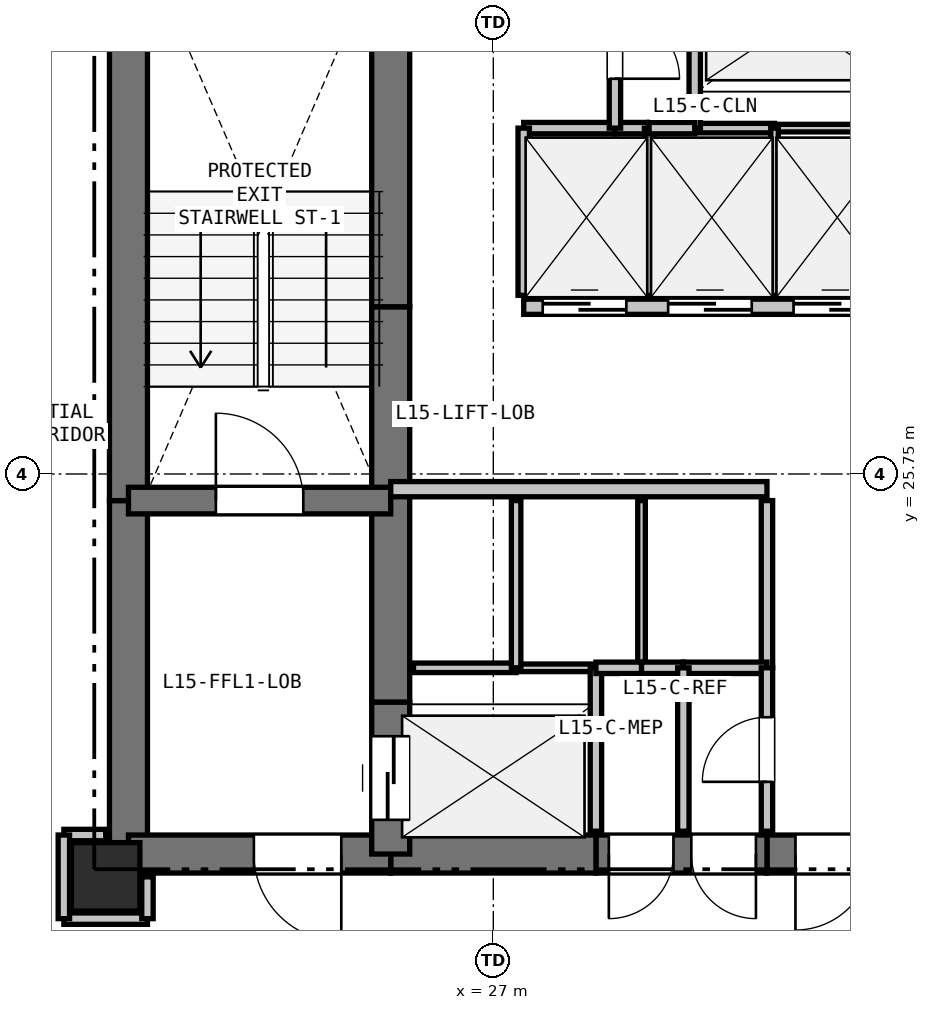
"""IFC4 building model, lengths in metres.
Left out: names, types, materials, properties, quantities, classifications, styles, units other than length and angle.
Written with IfcOpenShell. Run it as: python <this file> out.ifc"""

import sys

from ifc_helpers import new_model, si_unit, direction, frame, frame_2d, origin, origin_2d, place, context, subcontext, project, spatial, rectangle, extrude, element, fill, save


model = new_model("IFC4")
c1 = context("Model", 3, precision=1e-05, world=origin(), true_north=direction((0.0, 1.0)))
c2 = subcontext(c1, "Body", "Model", "MODEL_VIEW")
j1 = project(units=[si_unit("LENGTHUNIT", "METRE"), si_unit("PLANEANGLEUNIT", "RADIAN")], contexts=[c1])
p1 = place(None, origin())
s1 = spatial("IfcSite", under=j1, at=p1, CompositionType="ELEMENT")
p2 = place(p1, origin())
s2 = spatial("IfcBuilding", under=s1, at=p2, CompositionType="ELEMENT")
p3 = place(p2, frame((0.0, 0.0, 55.5)))
s3 = spatial("IfcBuildingStorey", under=s2, at=p3, CompositionType="ELEMENT", Elevation=55.5)
p4 = place(p3, frame((21.9, 20.45, 0.0), z_axis=(0.0, 0.0, 1.0), x_axis=(1.0, 0.0, 0.0)))
e1 = element("IfcColumn", 1, at=p4, inside=s3, PredefinedType="COLUMN", context=c2, shape_type="SweptSolid", body=[
    extrude(rectangle(XDim=0.9, YDim=0.9, at=origin_2d()), origin(), (0.0, 0.0, 1.0), 3.3),
])
p5 = place(p3, frame((22.2, 20.75, 0.0), z_axis=(0.0, 0.0, 1.0), x_axis=(0.0, 1.0, 0.0)))
e2 = element("IfcWall", 2, at=p5, inside=s3, PredefinedType="SHEAR", context=c2, shape_type="SweptSolid", body=[
    extrude(rectangle(XDim=4.65, YDim=0.5, at=frame_2d((2.325, 0.0))), origin(), (0.0, 0.0, 1.0), 3.04),
])
p6 = place(p3, frame((22.2, 25.4, 0.0), z_axis=(0.0, 0.0, 1.0), x_axis=(0.0, 1.0, 0.0)))
e3 = element("IfcWall", 3, at=p6, inside=s3, PredefinedType="SHEAR", context=c2, shape_type="SweptSolid", body=[
    extrude(rectangle(XDim=7.35, YDim=0.5, at=frame_2d((3.675, 0.0))), origin(), (0.0, 0.0, 1.0), 3.04),
])
p7 = place(p3, frame((32.35, 20.75, 0.0), z_axis=(0.0, 0.0, 1.0), x_axis=(-1.0, 0.0, 0.0)))
e4 = element("IfcWall", 4, at=p7, inside=s3, PredefinedType="SHEAR", context=c2, shape_type="SweptSolid", body=[
    extrude(rectangle(XDim=1.75, YDim=0.5, at=frame_2d((0.875, 0.0))), origin(), (0.0, 0.0, 1.0), 3.04),
])
p8 = place(p7, frame((0.375, 0.0, 0.0)))
e5 = element("IfcOpeningElement", 5, at=p8, cuts=e4, PredefinedType="OPENING", context=c2, shape_type="SweptSolid", body=[
    extrude(rectangle(XDim=1.0, YDim=2.15, at=frame_2d((0.5, 1.075))), frame((0.0, 0.26, 0.0), z_axis=(0.0, -1.0, 0.0), x_axis=(1.0, 0.0, 0.0)), (0.0, 0.0, 1.0), 0.52),
])
p9 = place(p3, frame((30.6, 20.75, 0.0), z_axis=(0.0, 0.0, 1.0), x_axis=(-1.0, 0.0, 0.0)))
e6 = element("IfcWall", 6, at=p9, inside=s3, PredefinedType="SHEAR", context=c2, shape_type="SweptSolid", body=[
    extrude(rectangle(XDim=2.25, YDim=0.5, at=frame_2d((1.125, 0.0))), origin(), (0.0, 0.0, 1.0), 3.04),
])
p10 = place(p9, frame((1.23, 0.0, 0.0)))
e7 = element("IfcOpeningElement", 7, at=p10, cuts=e6, PredefinedType="OPENING", context=c2, shape_type="SweptSolid", body=[
    extrude(rectangle(XDim=0.85, YDim=2.1, at=frame_2d((0.425, 1.05))), frame((0.0, 0.26, 0.0), z_axis=(0.0, -1.0, 0.0), x_axis=(1.0, 0.0, 0.0)), (0.0, 0.0, 1.0), 0.52),
])
p11 = place(p9, frame((0.145, 0.0, 0.0)))
e8 = element("IfcOpeningElement", 8, at=p11, cuts=e6, PredefinedType="OPENING", context=c2, shape_type="SweptSolid", body=[
    extrude(rectangle(XDim=0.85, YDim=2.1, at=frame_2d((0.425, 1.05))), frame((0.0, 0.26, 0.0), z_axis=(0.0, -1.0, 0.0), x_axis=(1.0, 0.0, 0.0)), (0.0, 0.0, 1.0), 0.52),
])
p12 = place(p3, frame((28.35, 20.75, 0.0), z_axis=(0.0, 0.0, 1.0), x_axis=(-1.0, 0.0, 0.0)))
e9 = element("IfcWall", 9, at=p12, inside=s3, PredefinedType="SHEAR", context=c2, shape_type="SweptSolid", body=[
    extrude(rectangle(XDim=2.7, YDim=0.5, at=frame_2d((1.35, 0.0))), origin(), (0.0, 0.0, 1.0), 3.04),
])
p13 = place(p3, frame((25.65, 20.75, 0.0), z_axis=(0.0, 0.0, 1.0), x_axis=(-1.0, 0.0, 0.0)))
e10 = element("IfcWall", 10, at=p13, inside=s3, PredefinedType="SHEAR", context=c2, shape_type="SweptSolid", body=[
    extrude(rectangle(XDim=3.45, YDim=0.5, at=frame_2d((1.725, 0.0))), origin(), (0.0, 0.0, 1.0), 3.04),
])
p14 = place(p13, frame((0.65, 0.0, 0.0)))
e11 = element("IfcOpeningElement", 11, at=p14, cuts=e10, PredefinedType="OPENING", context=c2, shape_type="SweptSolid", body=[
    extrude(rectangle(XDim=1.15, YDim=2.15, at=frame_2d((0.575, 1.075))), frame((0.0, 0.26, 0.0), z_axis=(0.0, -1.0, 0.0), x_axis=(1.0, 0.0, 0.0)), (0.0, 0.0, 1.0), 0.52),
])
p15 = place(p3, frame((25.65, 20.75, 0.0), z_axis=(0.0, 0.0, 1.0), x_axis=(0.0, 1.0, 0.0)))
e12 = element("IfcWall", 12, at=p15, inside=s3, PredefinedType="SHEAR", context=c2, shape_type="SweptSolid", body=[
    extrude(rectangle(XDim=2.0, YDim=0.5, at=frame_2d((1.0, 0.0))), origin(), (0.0, 0.0, 1.0), 3.04),
])
p16 = place(p15, frame((0.45, 0.0, 0.0)))
e13 = element("IfcOpeningElement", 13, at=p16, cuts=e12, PredefinedType="OPENING", context=c2, shape_type="SweptSolid", body=[
    extrude(rectangle(XDim=1.1, YDim=2.15, at=frame_2d((0.55, 1.075))), frame((0.0, 0.26, 0.0), z_axis=(0.0, -1.0, 0.0), x_axis=(1.0, 0.0, 0.0)), (0.0, 0.0, 1.0), 0.52),
])
p17 = place(p3, frame((25.65, 22.75, 0.0), z_axis=(0.0, 0.0, 1.0), x_axis=(0.0, 1.0, 0.0)))
e14 = element("IfcWall", 14, at=p17, inside=s3, PredefinedType="SHEAR", context=c2, shape_type="SweptSolid", body=[
    extrude(rectangle(XDim=2.8, YDim=0.5, at=frame_2d((1.4, 0.0))), origin(), (0.0, 0.0, 1.0), 3.04),
])
p18 = place(p3, frame((25.65, 25.55, 0.0), z_axis=(0.0, 0.0, 1.0), x_axis=(0.0, 1.0, 0.0)))
e15 = element("IfcWall", 15, at=p18, inside=s3, PredefinedType="SHEAR", context=c2, shape_type="SweptSolid", body=[
    extrude(rectangle(XDim=2.4, YDim=0.5, at=frame_2d((1.2, 0.0))), origin(), (0.0, 0.0, 1.0), 3.04),
])
p19 = place(p3, frame((25.65, 27.95, 0.0), z_axis=(0.0, 0.0, 1.0), x_axis=(0.0, 1.0, 0.0)))
e16 = element("IfcWall", 16, at=p19, inside=s3, PredefinedType="SHEAR", context=c2, shape_type="SweptSolid", body=[
    extrude(rectangle(XDim=4.8, YDim=0.5, at=frame_2d((2.4, 0.0))), origin(), (0.0, 0.0, 1.0), 3.04),
])
p20 = place(p3, frame((22.2, 25.4, 0.0), z_axis=(0.0, 0.0, 1.0), x_axis=(1.0, 0.0, 0.0)))
e17 = element("IfcWall", 17, at=p20, inside=s3, PredefinedType="SHEAR", context=c2, shape_type="SweptSolid", body=[
    extrude(rectangle(XDim=3.45, YDim=0.35, at=frame_2d((1.725, 0.0))), origin(), (0.0, 0.0, 1.0), 3.04),
])
p21 = place(p20, frame((1.15, 0.0, 0.0)))
e18 = element("IfcOpeningElement", 18, at=p21, cuts=e17, PredefinedType="OPENING", context=c2, shape_type="SweptSolid", body=[
    extrude(rectangle(XDim=1.15, YDim=2.15, at=frame_2d((0.575, 1.075))), frame((0.0, 0.185, 0.0), z_axis=(0.0, -1.0, 0.0), x_axis=(1.0, 0.0, 0.0)), (0.0, 0.0, 1.0), 0.37),
])
p22 = place(p3, frame((25.65, 25.55, 0.0), z_axis=(0.0, 0.0, 1.0), x_axis=(1.0, 0.0, 0.0)))
e19 = element("IfcWall", 19, at=p22, inside=s3, PredefinedType="PARTITIONING", context=c2, shape_type="SweptSolid", body=[
    extrude(rectangle(XDim=4.95, YDim=0.2, at=frame_2d((2.475, 0.0))), origin(), (0.0, 0.0, 1.0), 3.04),
])
p23 = place(p3, frame((27.4, 27.95, 0.0), z_axis=(0.0, 0.0, 1.0), x_axis=(1.0, 0.0, 0.0)))
e20 = element("IfcWall", 20, at=p23, inside=s3, PredefinedType="PARTITIONING", context=c2, shape_type="SweptSolid", body=[
    extrude(rectangle(XDim=4.95, YDim=0.2, at=frame_2d((2.475, 0.0))), origin(), (0.0, 0.0, 1.0), 3.04),
])
p24 = place(p23, frame((0.25, 0.0, 0.0)))
e21 = element("IfcOpeningElement", 21, at=p24, cuts=e20, PredefinedType="OPENING", context=c2, shape_type="SweptSolid", body=[
    extrude(rectangle(XDim=1.1, YDim=2.15, at=frame_2d((0.55, 1.075))), frame((0.0, 0.11, 0.0), z_axis=(0.0, -1.0, 0.0), x_axis=(1.0, 0.0, 0.0)), (0.0, 0.0, 1.0), 0.22),
])
p25 = place(p23, frame((1.9, 0.0, 0.0)))
e22 = element("IfcOpeningElement", 22, at=p25, cuts=e20, PredefinedType="OPENING", context=c2, shape_type="SweptSolid", body=[
    extrude(rectangle(XDim=1.1, YDim=2.15, at=frame_2d((0.55, 1.075))), frame((0.0, 0.11, 0.0), z_axis=(0.0, -1.0, 0.0), x_axis=(1.0, 0.0, 0.0)), (0.0, 0.0, 1.0), 0.22),
])
p26 = place(p23, frame((3.55, 0.0, 0.0)))
e23 = element("IfcOpeningElement", 23, at=p26, cuts=e20, PredefinedType="OPENING", context=c2, shape_type="SweptSolid", body=[
    extrude(rectangle(XDim=1.1, YDim=2.15, at=frame_2d((0.55, 1.075))), frame((0.0, 0.11, 0.0), z_axis=(0.0, -1.0, 0.0), x_axis=(1.0, 0.0, 0.0)), (0.0, 0.0, 1.0), 0.22),
])
p27 = place(p3, frame((25.95, 23.2, 0.0), z_axis=(0.0, 0.0, 1.0), x_axis=(1.0, 0.0, 0.0)))
e24 = element("IfcWall", 24, at=p27, inside=s3, PredefinedType="PARTITIONING", context=c2, shape_type="SweptSolid", body=[
    extrude(rectangle(XDim=1.35, YDim=0.125, at=frame_2d((0.675, 0.0))), origin(), (0.0, 0.0, 1.0), 3.04),
])
p28 = place(p3, frame((27.3, 23.2, 0.0), z_axis=(0.0, 0.0, 1.0), x_axis=(1.0, 0.0, 0.0)))
e25 = element("IfcWall", 25, at=p28, inside=s3, PredefinedType="PARTITIONING", context=c2, shape_type="SweptSolid", body=[
    extrude(rectangle(XDim=1.05, YDim=0.1, at=frame_2d((0.525, 0.0))), origin(), (0.0, 0.0, 1.0), 3.04),
])
p29 = place(p3, frame((28.35, 23.2, 0.0), z_axis=(0.0, 0.0, 1.0), x_axis=(0.0, -1.0, 0.0)))
e26 = element("IfcWall", 26, at=p29, inside=s3, PredefinedType="PARTITIONING", context=c2, shape_type="SweptSolid", body=[
    extrude(rectangle(XDim=2.15, YDim=0.15, at=frame_2d((1.075, 0.0))), origin(), (0.0, 0.0, 1.0), 3.04),
])
p30 = place(p3, frame((32.05, 30.3, 0.0), z_axis=(0.0, 0.0, 1.0), x_axis=(-1.0, 0.0, 0.0)))
e27 = element("IfcWall", 27, at=p30, inside=s3, PredefinedType="PARTITIONING", context=c2, shape_type="SweptSolid", body=[
    extrude(rectangle(XDim=1.35, YDim=0.1, at=frame_2d((0.675, 0.0))), origin(), (0.0, 0.0, 1.0), 3.04),
])
p31 = place(p3, frame((30.7, 30.3, 0.0), z_axis=(0.0, 0.0, 1.0), x_axis=(-1.0, 0.0, 0.0)))
e28 = element("IfcWall", 28, at=p31, inside=s3, PredefinedType="PARTITIONING", context=c2, shape_type="SweptSolid", body=[
    extrude(rectangle(XDim=1.05, YDim=0.125, at=frame_2d((0.525, 0.0))), origin(), (0.0, 0.0, 1.0), 3.04),
])
p32 = place(p3, frame((29.65, 30.3, 0.0), z_axis=(0.0, 0.0, 1.0), x_axis=(0.0, 1.0, 0.0)))
e29 = element("IfcWall", 29, at=p32, inside=s3, PredefinedType="PARTITIONING", context=c2, shape_type="SweptSolid", body=[
    extrude(rectangle(XDim=2.15, YDim=0.15, at=frame_2d((1.075, 0.0))), origin(), (0.0, 0.0, 1.0), 3.04),
])
p33 = place(p3, frame((27.3, 25.4, 0.0), z_axis=(0.0, 0.0, 1.0), x_axis=(0.0, -1.0, 0.0)))
e30 = element("IfcWall", 30, at=p33, inside=s3, PredefinedType="PARTITIONING", context=c2, shape_type="SweptSolid", body=[
    extrude(rectangle(XDim=2.2, YDim=0.125, at=frame_2d((1.1, 0.0))), origin(), (0.0, 0.0, 1.0), 3.04),
])
p34 = place(p3, frame((28.95, 25.4, 0.0), z_axis=(0.0, 0.0, 1.0), x_axis=(0.0, -1.0, 0.0)))
e31 = element("IfcWall", 31, at=p34, inside=s3, PredefinedType="PARTITIONING", context=c2, shape_type="SweptSolid", body=[
    extrude(rectangle(XDim=2.2, YDim=0.1, at=frame_2d((1.1, 0.0))), origin(), (0.0, 0.0, 1.0), 3.04),
])
p35 = place(p3, frame((28.95, 23.2, 0.0), z_axis=(0.0, 0.0, 1.0), x_axis=(-1.0, 0.0, 0.0)))
e32 = element("IfcWall", 32, at=p35, inside=s3, PredefinedType="PARTITIONING", context=c2, shape_type="SweptSolid", body=[
    extrude(rectangle(XDim=0.6, YDim=0.15, at=frame_2d((0.3, 0.0))), origin(), (0.0, 0.0, 1.0), 3.04),
])
p36 = place(p3, frame((30.6, 25.4, 0.0), z_axis=(0.0, 0.0, 1.0), x_axis=(0.0, -1.0, 0.0)))
e33 = element("IfcWall", 33, at=p36, inside=s3, PredefinedType="PARTITIONING", context=c2, shape_type="SweptSolid", body=[
    extrude(rectangle(XDim=2.2, YDim=0.15, at=frame_2d((1.1, 0.0))), origin(), (0.0, 0.0, 1.0), 3.04),
])
p37 = place(p3, frame((30.6, 23.2, 0.0), z_axis=(0.0, 0.0, 1.0), x_axis=(-1.0, 0.0, 0.0)))
e34 = element("IfcWall", 34, at=p37, inside=s3, PredefinedType="PARTITIONING", context=c2, shape_type="SweptSolid", body=[
    extrude(rectangle(XDim=1.1, YDim=0.15, at=frame_2d((0.55, 0.0))), origin(), (0.0, 0.0, 1.0), 3.04),
])
p38 = place(p3, frame((29.5, 23.2, 0.0), z_axis=(0.0, 0.0, 1.0), x_axis=(-1.0, 0.0, 0.0)))
e35 = element("IfcWall", 35, at=p38, inside=s3, PredefinedType="PARTITIONING", context=c2, shape_type="SweptSolid", body=[
    extrude(rectangle(XDim=0.55, YDim=0.15, at=frame_2d((0.275, 0.0))), origin(), (0.0, 0.0, 1.0), 3.04),
])
p39 = place(p3, frame((27.4, 30.3, 0.0), z_axis=(0.0, 0.0, 1.0), x_axis=(1.0, 0.0, 0.0)))
e36 = element("IfcWall", 36, at=p39, inside=s3, PredefinedType="PARTITIONING", context=c2, shape_type="SweptSolid", body=[
    extrude(rectangle(XDim=1.2, YDim=0.15, at=frame_2d((0.6, 0.0))), origin(), (0.0, 0.0, 1.0), 3.04),
])
p40 = place(p3, frame((28.6, 30.3, 0.0), z_axis=(0.0, 0.0, 1.0), x_axis=(1.0, 0.0, 0.0)))
e37 = element("IfcWall", 37, at=p40, inside=s3, PredefinedType="PARTITIONING", context=c2, shape_type="SweptSolid", body=[
    extrude(rectangle(XDim=0.45, YDim=0.15, at=frame_2d((0.225, 0.0))), origin(), (0.0, 0.0, 1.0), 3.04),
])
p41 = place(p3, frame((29.05, 30.3, 0.0), z_axis=(0.0, 0.0, 1.0), x_axis=(0.0, -1.0, 0.0)))
e38 = element("IfcWall", 38, at=p41, inside=s3, PredefinedType="PARTITIONING", context=c2, shape_type="SweptSolid", body=[
    extrude(rectangle(XDim=2.2, YDim=0.125, at=frame_2d((1.1, 0.0))), origin(), (0.0, 0.0, 1.0), 3.04),
])
p42 = place(p3, frame((27.4, 28.1, 0.0), z_axis=(0.0, 0.0, 1.0), x_axis=(0.0, 1.0, 0.0)))
e39 = element("IfcWall", 39, at=p42, inside=s3, PredefinedType="PARTITIONING", context=c2, shape_type="SweptSolid", body=[
    extrude(rectangle(XDim=2.2, YDim=0.15, at=frame_2d((1.1, 0.0))), origin(), (0.0, 0.0, 1.0), 3.04),
])
p43 = place(p3, frame((29.05, 30.3, 0.0), z_axis=(0.0, 0.0, 1.0), x_axis=(1.0, 0.0, 0.0)))
e40 = element("IfcWall", 40, at=p43, inside=s3, PredefinedType="PARTITIONING", context=c2, shape_type="SweptSolid", body=[
    extrude(rectangle(XDim=0.6, YDim=0.15, at=frame_2d((0.3, 0.0))), origin(), (0.0, 0.0, 1.0), 3.04),
])
p44 = place(p3, frame((30.7, 30.3, 0.0), z_axis=(0.0, 0.0, 1.0), x_axis=(0.0, -1.0, 0.0)))
e41 = element("IfcWall", 41, at=p44, inside=s3, PredefinedType="PARTITIONING", context=c2, shape_type="SweptSolid", body=[
    extrude(rectangle(XDim=2.2, YDim=0.1, at=frame_2d((1.1, 0.0))), origin(), (0.0, 0.0, 1.0), 3.04),
])
p45 = place(p3, frame((30.6, 21.05, 0.0), z_axis=(0.0, 0.0, 1.0), x_axis=(0.0, 1.0, 0.0)))
e42 = element("IfcWall", 42, at=p45, inside=s3, PredefinedType="PARTITIONING", context=c2, shape_type="SweptSolid", body=[
    extrude(rectangle(XDim=2.15, YDim=0.15, at=frame_2d((1.075, 0.0))), origin(), (0.0, 0.0, 1.0), 3.04),
])
p46 = place(p45, frame((0.65, 0.0, 0.0)))
e43 = element("IfcOpeningElement", 43, at=p46, cuts=e42, PredefinedType="OPENING", context=c2, shape_type="SweptSolid", body=[
    extrude(rectangle(XDim=0.85, YDim=2.1, at=frame_2d((0.425, 1.05))), frame((0.0, 0.085, 0.0), z_axis=(0.0, -1.0, 0.0), x_axis=(1.0, 0.0, 0.0)), (0.0, 0.0, 1.0), 0.17),
])
p47 = place(p3, frame((28.6, 32.45, 0.0), z_axis=(0.0, 0.0, 1.0), x_axis=(0.0, -1.0, 0.0)))
e44 = element("IfcWall", 44, at=p47, inside=s3, PredefinedType="PARTITIONING", context=c2, shape_type="SweptSolid", body=[
    extrude(rectangle(XDim=2.15, YDim=0.15, at=frame_2d((1.075, 0.0))), origin(), (0.0, 0.0, 1.0), 3.04),
])
p48 = place(p47, frame((0.65, 0.0, 0.0)))
e45 = element("IfcOpeningElement", 45, at=p48, cuts=e44, PredefinedType="OPENING", context=c2, shape_type="SweptSolid", body=[
    extrude(rectangle(XDim=0.85, YDim=2.1, at=frame_2d((0.425, 1.05))), frame((0.0, 0.085, 0.0), z_axis=(0.0, -1.0, 0.0), x_axis=(1.0, 0.0, 0.0)), (0.0, 0.0, 1.0), 0.17),
])
p49 = place(p3, frame((21.35, 19.9, 0.0), z_axis=(0.0, 0.0, 1.0), x_axis=(1.0, 0.0, 0.0)))
e46 = element("IfcWall", 46, at=p49, inside=s3, PredefinedType="PARTITIONING", context=c2, shape_type="SweptSolid", body=[
    extrude(rectangle(XDim=1.1, YDim=0.15, at=frame_2d((0.55, 0.0))), origin(), (0.0, 0.0, 1.0), 2.337),
])
p50 = place(p3, frame((22.45, 19.9, 0.0), z_axis=(0.0, 0.0, 1.0), x_axis=(0.0, 1.0, 0.0)))
e47 = element("IfcWall", 47, at=p50, inside=s3, PredefinedType="PARTITIONING", context=c2, shape_type="SweptSolid", body=[
    extrude(rectangle(XDim=0.55, YDim=0.15, at=frame_2d((0.275, 0.0))), origin(), (0.0, 0.0, 1.0), 2.337),
])
p51 = place(p3, frame((21.9, 21.0, 0.0), z_axis=(0.0, 0.0, 1.0), x_axis=(-1.0, 0.0, 0.0)))
e48 = element("IfcWall", 48, at=p51, inside=s3, PredefinedType="PARTITIONING", context=c2, shape_type="SweptSolid", body=[
    extrude(rectangle(XDim=0.55, YDim=0.15, at=frame_2d((0.275, 0.0))), origin(), (0.0, 0.0, 1.0), 2.488),
])
p52 = place(p3, frame((21.35, 21.0, 0.0), z_axis=(0.0, 0.0, 1.0), x_axis=(0.0, -1.0, 0.0)))
e49 = element("IfcWall", 49, at=p52, inside=s3, PredefinedType="PARTITIONING", context=c2, shape_type="SweptSolid", body=[
    extrude(rectangle(XDim=1.1, YDim=0.15, at=frame_2d((0.55, 0.0))), origin(), (0.0, 0.0, 1.0), 2.337),
])
p53 = place(p3, frame((29.5, 23.2, 0.0), z_axis=(0.0, 0.0, 1.0), x_axis=(0.0, -1.0, 0.0)))
e50 = element("IfcWall", 50, at=p53, inside=s3, PredefinedType="PARTITIONING", context=c2, shape_type="SweptSolid", body=[
    extrude(rectangle(XDim=2.15, YDim=0.15, at=frame_2d((1.075, 0.0))), origin(), (0.0, 0.0, 1.0), 3.04),
])
p54 = place(p24, origin())
e51 = element("IfcDoor", 51, at=p54, inside=s3, OperationType="SLIDING_TO_LEFT", PredefinedType="DOOR", context=c2, shape_type="SweptSolid", body=[
    extrude(rectangle(XDim=1.1, YDim=2.15, at=frame_2d((0.55, 1.075))), frame((0.0, 0.025, 0.0), z_axis=(0.0, -1.0, 0.0), x_axis=(1.0, 0.0, 0.0)), (0.0, 0.0, 1.0), 0.05),
])
fill(e21, e51)
p55 = place(p25, origin())
e52 = element("IfcDoor", 52, at=p55, inside=s3, OperationType="SLIDING_TO_LEFT", PredefinedType="DOOR", context=c2, shape_type="SweptSolid", body=[
    extrude(rectangle(XDim=1.1, YDim=2.15, at=frame_2d((0.55, 1.075))), frame((0.0, 0.025, 0.0), z_axis=(0.0, -1.0, 0.0), x_axis=(1.0, 0.0, 0.0)), (0.0, 0.0, 1.0), 0.05),
])
fill(e22, e52)
p56 = place(p26, origin())
e53 = element("IfcDoor", 53, at=p56, inside=s3, OperationType="SLIDING_TO_LEFT", PredefinedType="DOOR", context=c2, shape_type="SweptSolid", body=[
    extrude(rectangle(XDim=1.1, YDim=2.15, at=frame_2d((0.55, 1.075))), frame((0.0, 0.025, 0.0), z_axis=(0.0, -1.0, 0.0), x_axis=(1.0, 0.0, 0.0)), (0.0, 0.0, 1.0), 0.05),
])
fill(e23, e53)
p57 = place(p8, origin())
e54 = element("IfcDoor", 54, at=p57, inside=s3, OperationType="SINGLE_SWING_RIGHT", PredefinedType="DOOR", context=c2, shape_type="SweptSolid", body=[
    extrude(rectangle(XDim=1.0, YDim=2.15, at=frame_2d((0.5, 1.075))), frame((0.0, 0.025, 0.0), z_axis=(0.0, -1.0, 0.0), x_axis=(1.0, 0.0, 0.0)), (0.0, 0.0, 1.0), 0.05),
])
fill(e5, e54)
p58 = place(p16, origin())
e55 = element("IfcDoor", 55, at=p58, inside=s3, OperationType="SLIDING_TO_LEFT", PredefinedType="DOOR", context=c2, shape_type="SweptSolid", body=[
    extrude(rectangle(XDim=1.1, YDim=2.15, at=frame_2d((0.55, 1.075))), frame((0.0, 0.025, 0.0), z_axis=(0.0, -1.0, 0.0), x_axis=(1.0, 0.0, 0.0)), (0.0, 0.0, 1.0), 0.05),
])
fill(e13, e55)
p59 = place(p21, origin())
e56 = element("IfcDoor", 56, at=p59, inside=s3, OperationType="SINGLE_SWING_LEFT", PredefinedType="DOOR", context=c2, shape_type="SweptSolid", body=[
    extrude(rectangle(XDim=1.15, YDim=2.15, at=frame_2d((0.575, 1.075))), frame((0.0, 0.025, 0.0), z_axis=(0.0, -1.0, 0.0), x_axis=(1.0, 0.0, 0.0)), (0.0, 0.0, 1.0), 0.05),
])
fill(e18, e56)
p60 = place(p14, origin())
e57 = element("IfcDoor", 57, at=p60, inside=s3, OperationType="SINGLE_SWING_LEFT", PredefinedType="DOOR", context=c2, shape_type="SweptSolid", body=[
    extrude(rectangle(XDim=1.15, YDim=2.15, at=frame_2d((0.575, 1.075))), frame((0.0, 0.025, 0.0), z_axis=(0.0, -1.0, 0.0), x_axis=(1.0, 0.0, 0.0)), (0.0, 0.0, 1.0), 0.05),
])
fill(e11, e57)
p61 = place(p46, origin())
e58 = element("IfcDoor", 58, at=p61, inside=s3, OperationType="SINGLE_SWING_LEFT", PredefinedType="DOOR", context=c2, shape_type="SweptSolid", body=[
    extrude(rectangle(XDim=0.85, YDim=2.1, at=frame_2d((0.425, 1.05))), frame((0.0, 0.025, 0.0), z_axis=(0.0, -1.0, 0.0), x_axis=(1.0, 0.0, 0.0)), (0.0, 0.0, 1.0), 0.05),
])
fill(e43, e58)
p62 = place(p48, origin())
e59 = element("IfcDoor", 59, at=p62, inside=s3, OperationType="SINGLE_SWING_RIGHT", PredefinedType="DOOR", context=c2, shape_type="SweptSolid", body=[
    extrude(rectangle(XDim=0.85, YDim=2.1, at=frame_2d((0.425, 1.05))), frame((0.0, 0.025, 0.0), z_axis=(0.0, -1.0, 0.0), x_axis=(1.0, 0.0, 0.0)), (0.0, 0.0, 1.0), 0.05),
])
fill(e45, e59)
p63 = place(p10, origin())
e60 = element("IfcDoor", 60, at=p63, inside=s3, OperationType="SINGLE_SWING_RIGHT", PredefinedType="DOOR", context=c2, shape_type="SweptSolid", body=[
    extrude(rectangle(XDim=0.85, YDim=2.1, at=frame_2d((0.425, 1.05))), frame((0.0, 0.025, 0.0), z_axis=(0.0, -1.0, 0.0), x_axis=(1.0, 0.0, 0.0)), (0.0, 0.0, 1.0), 0.05),
])
fill(e7, e60)
p64 = place(p11, origin())
e61 = element("IfcDoor", 61, at=p64, inside=s3, OperationType="SINGLE_SWING_LEFT", PredefinedType="DOOR", context=c2, shape_type="SweptSolid", body=[
    extrude(rectangle(XDim=0.85, YDim=2.1, at=frame_2d((0.425, 1.05))), frame((0.0, 0.025, 0.0), z_axis=(0.0, -1.0, 0.0), x_axis=(1.0, 0.0, 0.0)), (0.0, 0.0, 1.0), 0.05),
])
fill(e8, e61)
save(model, sys.argv[1])
